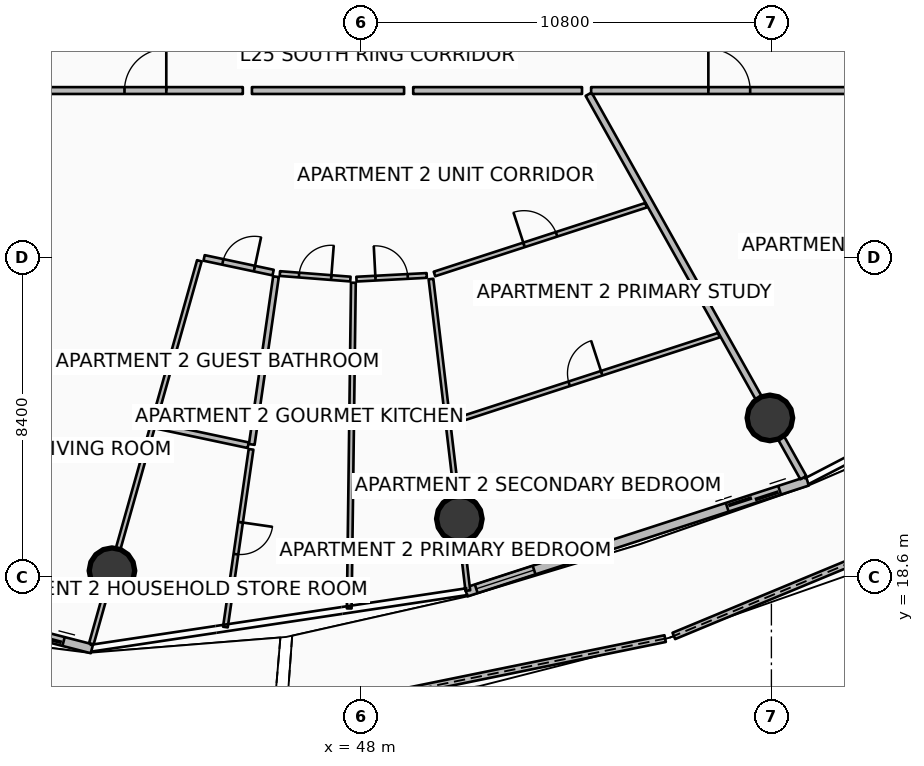
"""IFC4 building model, lengths in metres.
Left out: names, types, materials, properties, quantities, classifications, styles, units other than length and angle.
Written with IfcOpenShell. Run it as: python <this file> out.ifc"""

import sys

from ifc_helpers import new_model, si_unit, direction, frame, frame_2d, origin, origin_2d, place, context, subcontext, project, spatial, polyline, rectangle, circle, outline, extrude, element, fill, save


model = new_model("IFC4")
c1 = context("Model", 3, precision=1e-05, world=origin(), true_north=direction((0.0, 1.0)))
c2 = subcontext(c1, "Body", "Model", "MODEL_VIEW")
j1 = project(units=[si_unit("LENGTHUNIT", "METRE"), si_unit("PLANEANGLEUNIT", "RADIAN")], contexts=[c1])
p1 = place(None, origin())
s1 = spatial("IfcSite", under=j1, at=p1, CompositionType="ELEMENT")
p2 = place(p1, origin())
s2 = spatial("IfcBuilding", under=s1, at=p2, CompositionType="ELEMENT")
p3 = place(p2, frame((0.0, 0.0, 101.4)))
s3 = spatial("IfcBuildingStorey", under=s2, at=p3, CompositionType="ELEMENT", Elevation=101.4)
for number, where, z_axis, x_axis in (
    (1, (41.447, 18.766, 0.0), (0.0, 0.0, 1.0), (1.0, 0.0, 0.0)),
    (2, (50.588, 20.131, 0.0), (0.0, 0.0, 1.0), (1.0, 0.0, 0.0)),
    (3, (58.76, 22.786, 0.0), (0.0, 0.0, 1.0), (1.0, 0.0, 0.0)),
):
    element("IfcColumn", number, at=place(p3, frame(where, z_axis=z_axis, x_axis=x_axis)), inside=s3, PredefinedType="COLUMN", context=c2, shape_type="SweptSolid", body=[
        extrude(circle(Radius=0.6, at=origin_2d()), origin(), (0.0, 0.0, 1.0), 3.5),
    ])
p4 = place(p3, frame((34.799, 15.846, 0.0), z_axis=(0.0, 0.0, 1.0), x_axis=(0.996375069037, -0.08506892383, 0.0)))
e4 = element("IfcWall", 4, at=p4, inside=s3, PredefinedType="PARAPET", context=c2, shape_type="SweptSolid", body=[
    extrude(outline(polyline([(0.0, 0.0), (10.943, 0.0), (10.943, 1.483), (5.471, 1.284), (0.0, 1.148), (0.0, 0.0)])), frame((0.0, 0.09, 0.0), z_axis=(0.0, -1.0, 0.0), x_axis=(1.0, 0.0, 0.0)), (0.0, 0.0, 1.0), 0.18),
])
p5 = place(p3, frame((46.037, 14.945, 0.0), z_axis=(0.0, 0.0, 1.0), x_axis=(0.979793885894, 0.200009852668, 0.0)))
e5 = element("IfcWall", 5, at=p5, inside=s3, PredefinedType="PARAPET", context=c2, shape_type="SweptSolid", body=[
    extrude(outline(polyline([(0.0, 0.0), (10.173, 0.0), (10.173, 1.832), (5.086, 1.696), (0.0, 1.497), (0.0, 0.0)])), frame((0.0, 0.09, 0.0), z_axis=(0.0, -1.0, 0.0), x_axis=(1.0, 0.0, 0.0)), (0.0, 0.0, 1.0), 0.18),
])
p6 = place(p3, frame((56.233, 17.05, 0.0), z_axis=(0.0, 0.0, 1.0), x_axis=(0.92370541506, 0.383103518894, 0.0)))
e6 = element("IfcWall", 6, at=p6, inside=s3, PredefinedType="PARAPET", context=c2, shape_type="SweptSolid", body=[
    extrude(outline(polyline([(0.0, 0.0), (10.277, 0.0), (10.277, 1.756), (5.139, 1.853), (0.0, 1.832), (0.0, 0.0)])), frame((0.0, 0.09, 0.0), z_axis=(0.0, -1.0, 0.0), x_axis=(1.0, 0.0, 0.0)), (0.0, 0.0, 1.0), 0.18),
])
p7 = place(p3, frame((30.186, 19.477, 0.0), z_axis=(0.0, 0.0, 1.0), x_axis=(0.968356180858, -0.249572248045, 0.0)))
e7 = element("IfcWall", 7, at=p7, inside=s3, PredefinedType="SOLIDWALL", context=c2, shape_type="SweptSolid", body=[
    extrude(rectangle(XDim=11.084, YDim=0.24, at=frame_2d((5.542, 0.0))), origin(), (0.0, 0.0, 1.0), 2.45),
])
p8 = place(p7, frame((8.865, 0.0, 0.0)))
e8 = element("IfcOpeningElement", 8, at=p8, cuts=e7, PredefinedType="OPENING", context=c2, shape_type="SweptSolid", body=[
    extrude(rectangle(XDim=1.45, YDim=2.15, at=frame_2d((0.725, 1.075))), frame((0.0, 0.13, 0.0), z_axis=(0.0, -1.0, 0.0), x_axis=(1.0, 0.0, 0.0)), (0.0, 0.0, 1.0), 0.26),
])
p9 = place(p7, frame((0.28, 0.0, 0.65)))
e9 = element("IfcOpeningElement", 9, at=p9, cuts=e7, PredefinedType="OPENING", context=c2, shape_type="SweptSolid", body=[
    extrude(rectangle(XDim=1.6, YDim=1.5, at=frame_2d((0.8, 0.75))), frame((0.0, 0.13, 0.0), z_axis=(0.0, -1.0, 0.0), x_axis=(1.0, 0.0, 0.0)), (0.0, 0.0, 1.0), 0.26),
])
p10 = place(p3, frame((50.767, 18.203, 0.0), z_axis=(0.0, 0.0, 1.0), x_axis=(0.951052494852, 0.30902937083, 0.0)))
e10 = element("IfcWall", 10, at=p10, inside=s3, PredefinedType="SOLIDWALL", context=c2, shape_type="SweptSolid", body=[
    extrude(rectangle(XDim=9.444, YDim=0.24, at=frame_2d((4.722, 0.0))), origin(), (0.0, 0.0, 1.0), 2.45),
])
p11 = place(p10, frame((7.224, 0.0, 0.0)))
e11 = element("IfcOpeningElement", 11, at=p11, cuts=e10, PredefinedType="OPENING", context=c2, shape_type="SweptSolid", body=[
    extrude(rectangle(XDim=1.45, YDim=2.15, at=frame_2d((0.725, 1.075))), frame((0.0, 0.13, 0.0), z_axis=(0.0, -1.0, 0.0), x_axis=(1.0, 0.0, 0.0)), (0.0, 0.0, 1.0), 0.26),
])
p12 = place(p10, frame((0.28, 0.0, 0.65)))
e12 = element("IfcOpeningElement", 12, at=p12, cuts=e10, PredefinedType="OPENING", context=c2, shape_type="SweptSolid", body=[
    extrude(rectangle(XDim=1.6, YDim=1.5, at=frame_2d((0.8, 0.75))), frame((0.0, 0.13, 0.0), z_axis=(0.0, -1.0, 0.0), x_axis=(1.0, 0.0, 0.0)), (0.0, 0.0, 1.0), 0.26),
])
p13 = place(p3, frame((53.99, 31.304, 0.0), z_axis=(0.0, 0.0, 1.0), x_axis=(0.488628442553, -0.872491974249, 0.0)))
e13 = element("IfcWall", 13, at=p13, inside=s3, PredefinedType="PARTITIONING", context=c2, shape_type="SweptSolid", body=[
    extrude(rectangle(XDim=11.563, YDim=0.18, at=frame_2d((5.782, 0.0))), origin(), (0.0, 0.0, 1.0), 2.94),
])
p14 = place(p3, frame((39.764, 31.4, 0.0), z_axis=(0.0, 0.0, 1.0), x_axis=(1.0, 0.0, 0.0)))
e14 = element("IfcWall", 14, at=p14, inside=s3, PredefinedType="PARTITIONING", context=c2, shape_type="SweptSolid", body=[
    extrude(rectangle(XDim=5.127, YDim=0.18, at=frame_2d((2.563, 0.0))), origin(), (0.0, 0.0, 1.0), 2.94),
])
p15 = place(p14, frame((2.013, 0.0, 0.0)))
e15 = element("IfcOpeningElement", 15, at=p15, cuts=e14, PredefinedType="OPENING", context=c2, shape_type="SweptSolid", body=[
    extrude(rectangle(XDim=1.1, YDim=2.1, at=frame_2d((0.55, 1.05))), frame((0.0, 0.1, 0.0), z_axis=(0.0, -1.0, 0.0), x_axis=(1.0, 0.0, 0.0)), (0.0, 0.0, 1.0), 0.2),
])
p16 = place(p3, frame((45.131, 31.4, 0.0), z_axis=(0.0, 0.0, 1.0), x_axis=(1.0, 0.0, 0.0)))
e16 = element("IfcWall", 16, at=p16, inside=s3, PredefinedType="PARTITIONING", context=c2, shape_type="SweptSolid", body=[
    extrude(rectangle(XDim=4.004, YDim=0.18, at=frame_2d((2.002, 0.0))), origin(), (0.0, 0.0, 1.0), 2.94),
])
p17 = place(p3, frame((43.747, 26.92, 0.0), z_axis=(0.0, 0.0, 1.0), x_axis=(-0.271445765154, -0.962453737371, 0.0)))
e17 = element("IfcWall", 17, at=p17, inside=s3, PredefinedType="PARTITIONING", context=c2, shape_type="SweptSolid", body=[
    extrude(rectangle(XDim=10.47, YDim=0.125, at=frame_2d((5.235, 0.0))), origin(), (0.0, 0.0, 1.0), 2.94),
])
p18 = place(p3, frame((43.872, 26.996, 0.0), z_axis=(0.0, 0.0, 1.0), x_axis=(0.978233316216, -0.207508021641, 0.0)))
e18 = element("IfcWall", 18, at=p18, inside=s3, PredefinedType="PARTITIONING", context=c2, shape_type="SweptSolid", body=[
    extrude(rectangle(XDim=1.857, YDim=0.15, at=frame_2d((0.928, 0.0))), origin(), (0.0, 0.0, 1.0), 2.94),
])
p19 = place(p18, frame((0.503, 0.0, 0.0)))
e19 = element("IfcOpeningElement", 19, at=p19, cuts=e18, PredefinedType="OPENING", context=c2, shape_type="SweptSolid", body=[
    extrude(rectangle(XDim=0.85, YDim=2.06, at=frame_2d((0.425, 1.03))), frame((0.0, 0.085, 0.0), z_axis=(0.0, -1.0, 0.0), x_axis=(1.0, 0.0, 0.0)), (0.0, 0.0, 1.0), 0.17),
])
p20 = place(p3, frame((42.626, 22.578, 0.0), z_axis=(0.0, 0.0, 1.0), x_axis=(0.978227408947, -0.207535867706, 0.0)))
e20 = element("IfcWall", 20, at=p20, inside=s3, PredefinedType="PARTITIONING", context=c2, shape_type="SweptSolid", body=[
    extrude(rectangle(XDim=2.46, YDim=0.15, at=frame_2d((1.23, 0.0))), origin(), (0.0, 0.0, 1.0), 2.94),
])
p21 = place(p3, frame((45.763, 26.502, 0.0), z_axis=(0.0, 0.0, 1.0), x_axis=(-0.142823722461, -0.989748141853, 0.0)))
e21 = element("IfcWall", 21, at=p21, inside=s3, PredefinedType="PARTITIONING", context=c2, shape_type="SweptSolid", body=[
    extrude(rectangle(XDim=4.46, YDim=0.15, at=frame_2d((2.23, 0.0))), origin(), (0.0, 0.0, 1.0), 2.94),
])
p22 = place(p3, frame((45.108, 21.96, 0.0), z_axis=(0.0, 0.0, 1.0), x_axis=(-0.142860663544, -0.989742810437, 0.0)))
e22 = element("IfcWall", 22, at=p22, inside=s3, PredefinedType="PARTITIONING", context=c2, shape_type="SweptSolid", body=[
    extrude(rectangle(XDim=4.725, YDim=0.125, at=frame_2d((2.363, 0.0))), origin(), (0.0, 0.0, 1.0), 2.94),
])
p23 = place(p22, frame((1.938, 0.0, 0.0)))
e23 = element("IfcOpeningElement", 23, at=p23, cuts=e22, PredefinedType="OPENING", context=c2, shape_type="SweptSolid", body=[
    extrude(rectangle(XDim=0.85, YDim=2.06, at=frame_2d((0.425, 1.03))), frame((0.0, 0.073, 0.0), z_axis=(0.0, -1.0, 0.0), x_axis=(1.0, 0.0, 0.0)), (0.0, 0.0, 1.0), 0.145),
])
p24 = place(p3, frame((47.8, 26.343, 0.0), z_axis=(0.0, 0.0, 1.0), x_axis=(-0.012762129717, -0.999918560706, 0.0)))
e24 = element("IfcWall", 24, at=p24, inside=s3, PredefinedType="PARTITIONING", context=c2, shape_type="SweptSolid", body=[
    extrude(rectangle(XDim=8.57, YDim=0.125, at=frame_2d((4.285, 0.0))), origin(), (0.0, 0.0, 1.0), 2.94),
])
p25 = place(p3, frame((45.866, 26.585, 0.0), z_axis=(0.0, 0.0, 1.0), x_axis=(0.996949395434, -0.078050643458, 0.0)))
e25 = element("IfcWall", 25, at=p25, inside=s3, PredefinedType="PARTITIONING", context=c2, shape_type="SweptSolid", body=[
    extrude(rectangle(XDim=1.861, YDim=0.125, at=frame_2d((0.931, 0.0))), origin(), (0.0, 0.0, 1.0), 2.94),
])
p26 = place(p25, frame((0.506, 0.0, 0.0)))
e26 = element("IfcOpeningElement", 26, at=p26, cuts=e25, PredefinedType="OPENING", context=c2, shape_type="SweptSolid", body=[
    extrude(rectangle(XDim=0.85, YDim=2.06, at=frame_2d((0.425, 1.03))), frame((0.0, 0.073, 0.0), z_axis=(0.0, -1.0, 0.0), x_axis=(1.0, 0.0, 0.0)), (0.0, 0.0, 1.0), 0.145),
])
p27 = place(p3, frame((47.881, 26.438, 0.0), z_axis=(0.0, 0.0, 1.0), x_axis=(0.998621833411, 0.052482700343, 0.0)))
e27 = element("IfcWall", 27, at=p27, inside=s3, PredefinedType="PARTITIONING", context=c2, shape_type="SweptSolid", body=[
    extrude(rectangle(XDim=1.851, YDim=0.125, at=frame_2d((0.926, 0.0))), origin(), (0.0, 0.0, 1.0), 2.94),
])
p28 = place(p27, frame((0.5, 0.0, 0.0)))
e28 = element("IfcOpeningElement", 28, at=p28, cuts=e27, PredefinedType="OPENING", context=c2, shape_type="SweptSolid", body=[
    extrude(rectangle(XDim=0.85, YDim=2.06, at=frame_2d((0.425, 1.03))), frame((0.0, 0.073, 0.0), z_axis=(0.0, -1.0, 0.0), x_axis=(1.0, 0.0, 0.0)), (0.0, 0.0, 1.0), 0.145),
])
p29 = place(p3, frame((49.375, 31.4, 0.0), z_axis=(0.0, 0.0, 1.0), x_axis=(1.0, 0.0, 0.0)))
e29 = element("IfcWall", 29, at=p29, inside=s3, PredefinedType="PARTITIONING", context=c2, shape_type="SweptSolid", body=[
    extrude(rectangle(XDim=4.442, YDim=0.18, at=frame_2d((2.221, 0.0))), origin(), (0.0, 0.0, 1.0), 2.94),
])
p30 = place(p3, frame((49.842, 26.441, 0.0), z_axis=(0.0, 0.0, 1.0), x_axis=(0.11753793763, -0.993068393021, 0.0)))
e30 = element("IfcWall", 30, at=p30, inside=s3, PredefinedType="PARTITIONING", context=c2, shape_type="SweptSolid", body=[
    extrude(rectangle(XDim=8.254, YDim=0.125, at=frame_2d((4.127, 0.0))), origin(), (0.0, 0.0, 1.0), 2.94),
])
p31 = place(p3, frame((49.934, 26.574, 0.0), z_axis=(0.0, 0.0, 1.0), x_axis=(0.951057969744, 0.309012521082, 0.0)))
e31 = element("IfcWall", 31, at=p31, inside=s3, PredefinedType="PARTITIONING", context=c2, shape_type="SweptSolid", body=[
    extrude(rectangle(XDim=5.854, YDim=0.125, at=frame_2d((2.927, 0.0))), origin(), (0.0, 0.0, 1.0), 2.94),
])
p32 = place(p31, frame((2.477, 0.0, 0.0)))
e32 = element("IfcOpeningElement", 32, at=p32, cuts=e31, PredefinedType="OPENING", context=c2, shape_type="SweptSolid", body=[
    extrude(rectangle(XDim=0.9, YDim=2.08, at=frame_2d((0.45, 1.04))), frame((0.0, 0.073, 0.0), z_axis=(0.0, -1.0, 0.0), x_axis=(1.0, 0.0, 0.0)), (0.0, 0.0, 1.0), 0.145),
])
p33 = place(p3, frame((50.395, 22.682, 0.0), z_axis=(0.0, 0.0, 1.0), x_axis=(0.951062980527, 0.308997098808, 0.0)))
e33 = element("IfcWall", 33, at=p33, inside=s3, PredefinedType="PARTITIONING", context=c2, shape_type="SweptSolid", body=[
    extrude(rectangle(XDim=7.384, YDim=0.125, at=frame_2d((3.692, 0.0))), origin(), (0.0, 0.0, 1.0), 2.94),
])
p34 = place(p33, frame((3.242, 0.0, 0.0)))
e34 = element("IfcOpeningElement", 34, at=p34, cuts=e33, PredefinedType="OPENING", context=c2, shape_type="SweptSolid", body=[
    extrude(rectangle(XDim=0.9, YDim=2.08, at=frame_2d((0.45, 1.04))), frame((0.0, 0.073, 0.0), z_axis=(0.0, -1.0, 0.0), x_axis=(1.0, 0.0, 0.0)), (0.0, 0.0, 1.0), 0.145),
])
p35 = place(p3, frame((54.056, 31.4, 0.0), z_axis=(0.0, 0.0, 1.0), x_axis=(1.0, 0.0, 0.0)))
e35 = element("IfcWall", 35, at=p35, inside=s3, PredefinedType="PARTITIONING", context=c2, shape_type="SweptSolid", body=[
    extrude(rectangle(XDim=7.27, YDim=0.18, at=frame_2d((3.635, 0.0))), origin(), (0.0, 0.0, 1.0), 2.94),
])
p36 = place(p35, frame((3.085, 0.0, 0.0)))
e36 = element("IfcOpeningElement", 36, at=p36, cuts=e35, PredefinedType="OPENING", context=c2, shape_type="SweptSolid", body=[
    extrude(rectangle(XDim=1.1, YDim=2.1, at=frame_2d((0.55, 1.05))), frame((0.0, 0.1, 0.0), z_axis=(0.0, -1.0, 0.0), x_axis=(1.0, 0.0, 0.0)), (0.0, 0.0, 1.0), 0.2),
])
p37 = place(p8, origin())
e37 = element("IfcDoor", 37, at=p37, inside=s3, OperationType="DOUBLE_DOOR_SLIDING", PredefinedType="DOOR", context=c2, shape_type="SweptSolid", body=[
    extrude(rectangle(XDim=1.45, YDim=2.15, at=frame_2d((0.725, 1.075))), frame((0.0, 0.025, 0.0), z_axis=(0.0, -1.0, 0.0), x_axis=(1.0, 0.0, 0.0)), (0.0, 0.0, 1.0), 0.05),
])
fill(e8, e37)
p38 = place(p11, origin())
e38 = element("IfcDoor", 38, at=p38, inside=s3, OperationType="DOUBLE_DOOR_SLIDING", PredefinedType="DOOR", context=c2, shape_type="SweptSolid", body=[
    extrude(rectangle(XDim=1.45, YDim=2.15, at=frame_2d((0.725, 1.075))), frame((0.0, 0.025, 0.0), z_axis=(0.0, -1.0, 0.0), x_axis=(1.0, 0.0, 0.0)), (0.0, 0.0, 1.0), 0.05),
])
fill(e11, e38)
p39 = place(p12, origin())
e39 = element("IfcWindow", 39, at=p39, inside=s3, PartitioningType="SINGLE_PANEL", PredefinedType="WINDOW", context=c2, shape_type="SweptSolid", body=[
    extrude(rectangle(XDim=1.6, YDim=1.5, at=frame_2d((0.8, 0.75))), frame((0.0, 0.03, 0.0), z_axis=(0.0, -1.0, 0.0), x_axis=(1.0, 0.0, 0.0)), (0.0, 0.0, 1.0), 0.06),
])
fill(e12, e39)
p40 = place(p15, origin())
e40 = element("IfcDoor", 40, at=p40, inside=s3, OperationType="SINGLE_SWING_RIGHT", PredefinedType="DOOR", context=c2, shape_type="SweptSolid", body=[
    extrude(rectangle(XDim=1.1, YDim=2.1, at=frame_2d((0.55, 1.05))), frame((0.0, 0.025, 0.0), z_axis=(0.0, -1.0, 0.0), x_axis=(1.0, 0.0, 0.0)), (0.0, 0.0, 1.0), 0.05),
])
fill(e15, e40)
p41 = place(p19, origin())
e41 = element("IfcDoor", 41, at=p41, inside=s3, OperationType="SINGLE_SWING_RIGHT", PredefinedType="DOOR", context=c2, shape_type="SweptSolid", body=[
    extrude(rectangle(XDim=0.85, YDim=2.06, at=frame_2d((0.425, 1.03))), frame((0.0, 0.025, 0.0), z_axis=(0.0, -1.0, 0.0), x_axis=(1.0, 0.0, 0.0)), (0.0, 0.0, 1.0), 0.05),
])
fill(e19, e41)
p42 = place(p23, origin())
e42 = element("IfcDoor", 42, at=p42, inside=s3, OperationType="SINGLE_SWING_LEFT", PredefinedType="DOOR", context=c2, shape_type="SweptSolid", body=[
    extrude(rectangle(XDim=0.85, YDim=2.06, at=frame_2d((0.425, 1.03))), frame((0.0, 0.025, 0.0), z_axis=(0.0, -1.0, 0.0), x_axis=(1.0, 0.0, 0.0)), (0.0, 0.0, 1.0), 0.05),
])
fill(e23, e42)
p43 = place(p26, origin())
e43 = element("IfcDoor", 43, at=p43, inside=s3, OperationType="SINGLE_SWING_RIGHT", PredefinedType="DOOR", context=c2, shape_type="SweptSolid", body=[
    extrude(rectangle(XDim=0.85, YDim=2.06, at=frame_2d((0.425, 1.03))), frame((0.0, 0.025, 0.0), z_axis=(0.0, -1.0, 0.0), x_axis=(1.0, 0.0, 0.0)), (0.0, 0.0, 1.0), 0.05),
])
fill(e26, e43)
p44 = place(p28, origin())
e44 = element("IfcDoor", 44, at=p44, inside=s3, OperationType="SINGLE_SWING_LEFT", PredefinedType="DOOR", context=c2, shape_type="SweptSolid", body=[
    extrude(rectangle(XDim=0.85, YDim=2.06, at=frame_2d((0.425, 1.03))), frame((0.0, 0.025, 0.0), z_axis=(0.0, -1.0, 0.0), x_axis=(1.0, 0.0, 0.0)), (0.0, 0.0, 1.0), 0.05),
])
fill(e28, e44)
p45 = place(p32, origin())
e45 = element("IfcDoor", 45, at=p45, inside=s3, OperationType="SINGLE_SWING_LEFT", PredefinedType="DOOR", context=c2, shape_type="SweptSolid", body=[
    extrude(rectangle(XDim=0.9, YDim=2.08, at=frame_2d((0.45, 1.04))), frame((0.0, 0.025, 0.0), z_axis=(0.0, -1.0, 0.0), x_axis=(1.0, 0.0, 0.0)), (0.0, 0.0, 1.0), 0.05),
])
fill(e32, e45)
p46 = place(p34, origin())
e46 = element("IfcDoor", 46, at=p46, inside=s3, OperationType="SINGLE_SWING_RIGHT", PredefinedType="DOOR", context=c2, shape_type="SweptSolid", body=[
    extrude(rectangle(XDim=0.9, YDim=2.08, at=frame_2d((0.45, 1.04))), frame((0.0, 0.025, 0.0), z_axis=(0.0, -1.0, 0.0), x_axis=(1.0, 0.0, 0.0)), (0.0, 0.0, 1.0), 0.05),
])
fill(e34, e46)
p47 = place(p36, origin())
e47 = element("IfcDoor", 47, at=p47, inside=s3, OperationType="SINGLE_SWING_LEFT", PredefinedType="DOOR", context=c2, shape_type="SweptSolid", body=[
    extrude(rectangle(XDim=1.1, YDim=2.1, at=frame_2d((0.55, 1.05))), frame((0.0, 0.025, 0.0), z_axis=(0.0, -1.0, 0.0), x_axis=(1.0, 0.0, 0.0)), (0.0, 0.0, 1.0), 0.05),
])
fill(e36, e47)
save(model, sys.argv[1])
